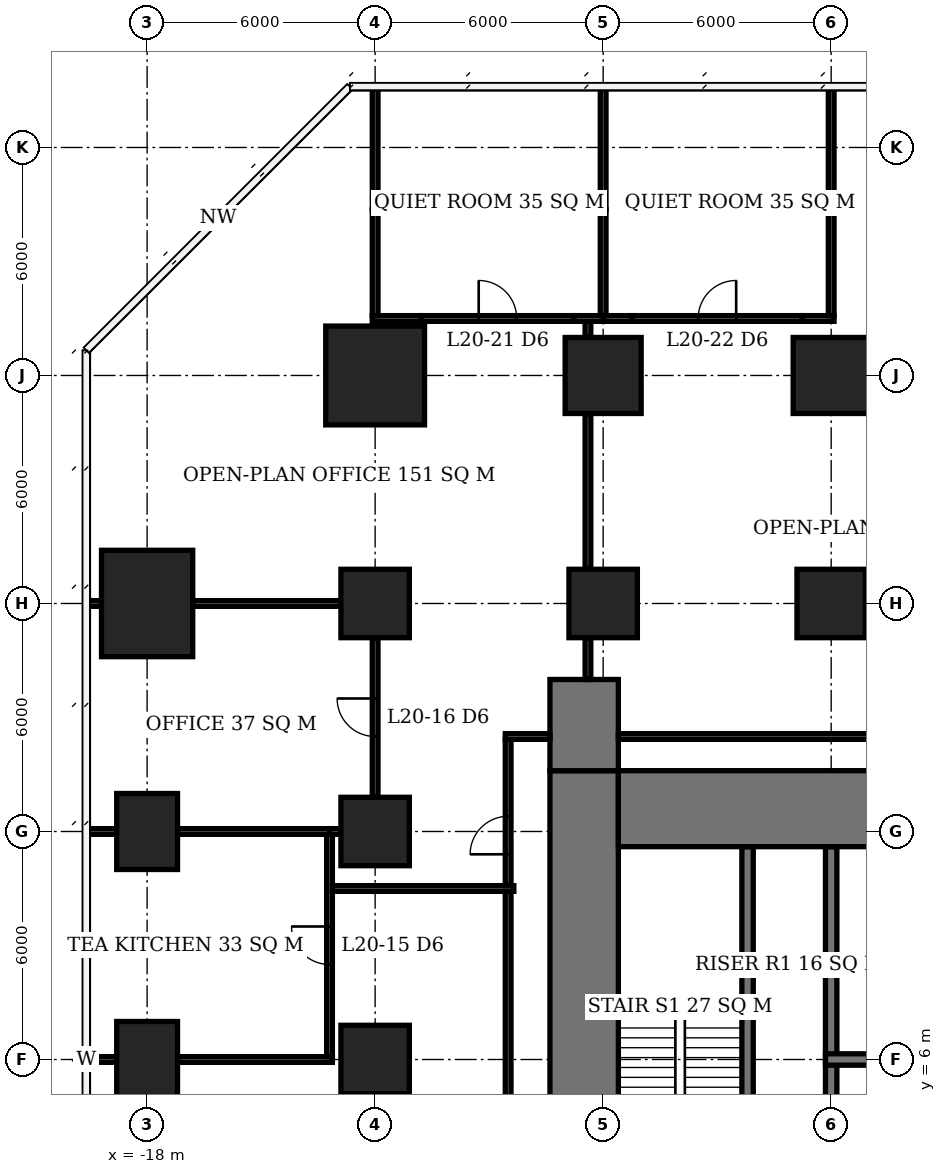
"""IFC4 building model, lengths in metres.
Left out: names, types, materials, properties, quantities, classifications, styles, units other than length and angle.
Written with IfcOpenShell. Run it as: python <this file> out.ifc"""

import sys

from ifc_helpers import new_model, si_unit, direction, frame, frame_2d, origin, origin_2d, place, context, subcontext, project, spatial, rectangle, extrude, element, fill, save


model = new_model("IFC4")
c1 = context("Model", 3, precision=1e-05, world=origin(), true_north=direction((0.0, 1.0)))
c2 = subcontext(c1, "Body", "Model", "MODEL_VIEW")
j1 = project(units=[si_unit("LENGTHUNIT", "METRE"), si_unit("PLANEANGLEUNIT", "RADIAN")], contexts=[c1])
p1 = place(None, origin())
s1 = spatial("IfcSite", under=j1, at=p1, CompositionType="ELEMENT")
p2 = place(p1, origin())
s2 = spatial("IfcBuilding", under=s1, at=p2, CompositionType="ELEMENT")
p3 = place(p2, frame((0.0, 0.0, 84.5)))
s3 = spatial("IfcBuildingStorey", under=s2, at=p3, CompositionType="ELEMENT", Elevation=84.5)
for number, where, z_axis, x_axis in (
    (1, (-18.0, 6.0, 0.0), (0.0, 0.0, 1.0), (0.0, 1.0, 0.0)),
    (2, (-18.0, 12.0, 0.0), (0.0, 0.0, 1.0), (0.0, 1.0, 0.0)),
):
    element("IfcColumn", number, at=place(p3, frame(where, z_axis=z_axis, x_axis=x_axis)), inside=s3, PredefinedType="COLUMN", context=c2, shape_type="SweptSolid", body=[
        extrude(rectangle(XDim=2.0, YDim=1.6, at=origin_2d()), origin(), (0.0, 0.0, 1.0), 3.9),
    ])
p4 = place(p3, frame((-18.0, 18.0, 0.0), z_axis=(0.0, 0.0, 1.0), x_axis=(0.0, 1.0, 0.0)))
e3 = element("IfcColumn", 3, at=p4, inside=s3, PredefinedType="COLUMN", context=c2, shape_type="SweptSolid", body=[
    extrude(rectangle(XDim=2.8, YDim=2.4, at=origin_2d()), origin(), (0.0, 0.0, 1.0), 3.9),
])
for number, where, z_axis, x_axis in (
    (4, (-12.0, 6.0, 0.0), (0.0, 0.0, 1.0), (1.0, 0.0, 0.0)),
    (5, (-12.0, 12.0, 0.0), (0.0, 0.0, 1.0), (1.0, 0.0, 0.0)),
    (6, (-12.0, 18.0, 0.0), (0.0, 0.0, 1.0), (1.0, 0.0, 0.0)),
):
    element("IfcColumn", number, at=place(p3, frame(where, z_axis=z_axis, x_axis=x_axis)), inside=s3, PredefinedType="COLUMN", context=c2, shape_type="SweptSolid", body=[
        extrude(rectangle(XDim=1.8, YDim=1.8, at=origin_2d()), origin(), (0.0, 0.0, 1.0), 3.9),
    ])
p5 = place(p3, frame((-12.0, 24.0, 0.0), z_axis=(0.0, 0.0, 1.0), x_axis=(1.0, 0.0, 0.0)))
e7 = element("IfcColumn", 7, at=p5, inside=s3, PredefinedType="COLUMN", context=c2, shape_type="SweptSolid", body=[
    extrude(rectangle(XDim=2.6, YDim=2.6, at=origin_2d()), origin(), (0.0, 0.0, 1.0), 3.9),
])
p6 = place(p3, frame((-6.0, 18.0, 0.0), z_axis=(0.0, 0.0, 1.0), x_axis=(1.0, 0.0, 0.0)))
e8 = element("IfcColumn", 8, at=p6, inside=s3, PredefinedType="COLUMN", context=c2, shape_type="SweptSolid", body=[
    extrude(rectangle(XDim=1.8, YDim=1.8, at=origin_2d()), origin(), (0.0, 0.0, 1.0), 3.9),
])
p7 = place(p3, frame((-6.0, 24.0, 0.0), z_axis=(0.0, 0.0, 1.0), x_axis=(1.0, 0.0, 0.0)))
e9 = element("IfcColumn", 9, at=p7, inside=s3, PredefinedType="COLUMN", context=c2, shape_type="SweptSolid", body=[
    extrude(rectangle(XDim=2.0, YDim=2.0, at=origin_2d()), origin(), (0.0, 0.0, 1.0), 3.9),
])
p8 = place(p3, frame((0.0, 18.0, 0.0), z_axis=(0.0, 0.0, 1.0), x_axis=(1.0, 0.0, 0.0)))
e10 = element("IfcColumn", 10, at=p8, inside=s3, PredefinedType="COLUMN", context=c2, shape_type="SweptSolid", body=[
    extrude(rectangle(XDim=1.8, YDim=1.8, at=origin_2d()), origin(), (0.0, 0.0, 1.0), 3.9),
])
p9 = place(p3, frame((0.0, 24.0, 0.0), z_axis=(0.0, 0.0, 1.0), x_axis=(1.0, 0.0, 0.0)))
e11 = element("IfcColumn", 11, at=p9, inside=s3, PredefinedType="COLUMN", context=c2, shape_type="SweptSolid", body=[
    extrude(rectangle(XDim=2.0, YDim=2.0, at=origin_2d()), origin(), (0.0, 0.0, 1.0), 3.9),
])
p10 = place(p3, frame((-5.6, 12.6, 0.0), z_axis=(0.0, 0.0, 1.0), x_axis=(1.0, 0.0, 0.0)))
e12 = element("IfcWall", 12, at=p10, inside=s3, PredefinedType="SHEAR", context=c2, shape_type="SweptSolid", body=[
    extrude(rectangle(XDim=23.2, YDim=2.0, at=frame_2d((11.6, 0.0))), origin(), (0.0, 0.0, 1.0), 3.9),
])
p11 = place(p3, frame((-6.5, -7.6, 0.0), z_axis=(0.0, 0.0, 1.0), x_axis=(0.0, 1.0, 0.0)))
e13 = element("IfcWall", 13, at=p11, inside=s3, PredefinedType="SHEAR", context=c2, shape_type="SweptSolid", body=[
    extrude(rectangle(XDim=21.2, YDim=1.8, at=frame_2d((10.6, 0.0))), origin(), (0.0, 0.0, 1.0), 3.9),
])
p12 = place(p11, frame((7.8, 0.0, 0.0)))
e14 = element("IfcOpeningElement", 14, at=p12, cuts=e13, PredefinedType="OPENING", context=c2, shape_type="SweptSolid", body=[
    extrude(rectangle(XDim=1.8, YDim=2.4, at=frame_2d((0.9, 1.2))), frame((0.0, 0.91, 0.0), z_axis=(0.0, -1.0, 0.0), x_axis=(1.0, 0.0, 0.0)), (0.0, 0.0, 1.0), 1.82),
])
p13 = place(p3, frame((-6.5, 13.6, 0.0), z_axis=(0.0, 0.0, 1.0), x_axis=(0.0, 1.0, 0.0)))
e15 = element("IfcWall", 15, at=p13, inside=s3, PredefinedType="SHEAR", context=c2, shape_type="SweptSolid", body=[
    extrude(rectangle(XDim=2.4, YDim=1.8, at=frame_2d((1.2, 0.0))), origin(), (0.0, 0.0, 1.0), 3.9),
])
p14 = place(p3, frame((-0.15, 6.0, 0.0), z_axis=(0.0, 0.0, 1.0), x_axis=(1.0, 0.0, 0.0)))
e16 = element("IfcWall", 16, at=p14, inside=s3, PredefinedType="SHEAR", context=c2, shape_type="SweptSolid", body=[
    extrude(rectangle(XDim=17.75, YDim=0.3, at=frame_2d((8.875, 0.0))), origin(), (0.0, 0.0, 1.0), 3.9),
])
p15 = place(p14, frame((13.15, 0.0, 0.0)))
e17 = element("IfcOpeningElement", 17, at=p15, cuts=e16, PredefinedType="OPENING", context=c2, shape_type="SweptSolid", body=[
    extrude(rectangle(XDim=0.9, YDim=2.1, at=frame_2d((0.45, 1.05))), frame((0.0, 0.16, 0.0), z_axis=(0.0, -1.0, 0.0), x_axis=(1.0, 0.0, 0.0)), (0.0, 0.0, 1.0), 0.32),
])
p16 = place(p14, frame((16.25, 0.0, 0.0)))
e18 = element("IfcOpeningElement", 18, at=p16, cuts=e16, PredefinedType="OPENING", context=c2, shape_type="SweptSolid", body=[
    extrude(rectangle(XDim=1.0, YDim=2.1, at=frame_2d((0.5, 1.05))), frame((0.0, 0.16, 0.0), z_axis=(0.0, -1.0, 0.0), x_axis=(1.0, 0.0, 0.0)), (0.0, 0.0, 1.0), 0.32),
])
p17 = place(p14, frame((1.1, 0.0, 0.0)))
e19 = element("IfcOpeningElement", 19, at=p17, cuts=e16, PredefinedType="OPENING", context=c2, shape_type="SweptSolid", body=[
    extrude(rectangle(XDim=1.1, YDim=2.1, at=frame_2d((0.55, 1.05))), frame((0.0, 0.16, 0.0), z_axis=(0.0, -1.0, 0.0), x_axis=(1.0, 0.0, 0.0)), (0.0, 0.0, 1.0), 0.32),
])
p18 = place(p14, frame((4.1, 0.0, 0.0)))
e20 = element("IfcOpeningElement", 20, at=p18, cuts=e16, PredefinedType="OPENING", context=c2, shape_type="SweptSolid", body=[
    extrude(rectangle(XDim=1.1, YDim=2.1, at=frame_2d((0.55, 1.05))), frame((0.0, 0.16, 0.0), z_axis=(0.0, -1.0, 0.0), x_axis=(1.0, 0.0, 0.0)), (0.0, 0.0, 1.0), 0.32),
])
p19 = place(p14, frame((7.1, 0.0, 0.0)))
e21 = element("IfcOpeningElement", 21, at=p19, cuts=e16, PredefinedType="OPENING", context=c2, shape_type="SweptSolid", body=[
    extrude(rectangle(XDim=1.1, YDim=2.1, at=frame_2d((0.55, 1.05))), frame((0.0, 0.16, 0.0), z_axis=(0.0, -1.0, 0.0), x_axis=(1.0, 0.0, 0.0)), (0.0, 0.0, 1.0), 0.32),
])
p20 = place(p14, frame((10.1, 0.0, 0.0)))
e22 = element("IfcOpeningElement", 22, at=p20, cuts=e16, PredefinedType="OPENING", context=c2, shape_type="SweptSolid", body=[
    extrude(rectangle(XDim=1.1, YDim=2.1, at=frame_2d((0.55, 1.05))), frame((0.0, 0.16, 0.0), z_axis=(0.0, -1.0, 0.0), x_axis=(1.0, 0.0, 0.0)), (0.0, 0.0, 1.0), 0.32),
])
for number, where, z_axis, x_axis in (
    (23, (0.0, 3.15, 0.0), (0.0, 0.0, 1.0), (0.0, 1.0, 0.0)),
    (24, (-2.2, 3.15, 0.0), (0.0, 0.0, 1.0), (0.0, 1.0, 0.0)),
):
    element("IfcWall", number, at=place(p3, frame(where, z_axis=z_axis, x_axis=x_axis)), inside=s3, PredefinedType="SHEAR", context=c2, shape_type="SweptSolid", body=[
        extrude(rectangle(XDim=8.45, YDim=0.3, at=frame_2d((4.225, 0.0))), origin(), (0.0, 0.0, 1.0), 3.9),
    ])
p21 = place(p3, frame((-19.55, 6.0, 0.0), z_axis=(0.0, 0.0, 1.0), x_axis=(1.0, 0.0, 0.0)))
e25 = element("IfcWall", 25, at=p21, inside=s3, PredefinedType="PARTITIONING", context=c2, shape_type="SweptSolid", body=[
    extrude(rectangle(XDim=0.75, YDim=0.15, at=frame_2d((0.375, 0.0))), origin(), (0.0, 0.0, 1.0), 2.15),
])
p22 = place(p3, frame((-17.2, 6.0, 0.0), z_axis=(0.0, 0.0, 1.0), x_axis=(1.0, 0.0, 0.0)))
e26 = element("IfcWall", 26, at=p22, inside=s3, PredefinedType="PARTITIONING", context=c2, shape_type="SweptSolid", body=[
    extrude(rectangle(XDim=4.075, YDim=0.15, at=frame_2d((2.038, 0.0))), origin(), (0.0, 0.0, 1.0), 3.65),
])
p23 = place(p3, frame((-19.6, 12.0, 0.0), z_axis=(0.0, 0.0, 1.0), x_axis=(1.0, 0.0, 0.0)))
e27 = element("IfcWall", 27, at=p23, inside=s3, PredefinedType="PARTITIONING", context=c2, shape_type="SweptSolid", body=[
    extrude(rectangle(XDim=0.8, YDim=0.15, at=frame_2d((0.4, 0.0))), origin(), (0.0, 0.0, 1.0), 2.15),
])
p24 = place(p3, frame((-17.2, 12.0, 0.0), z_axis=(0.0, 0.0, 1.0), x_axis=(1.0, 0.0, 0.0)))
e28 = element("IfcWall", 28, at=p24, inside=s3, PredefinedType="PARTITIONING", context=c2, shape_type="SweptSolid", body=[
    extrude(rectangle(XDim=4.075, YDim=0.15, at=frame_2d((2.038, 0.0))), origin(), (0.0, 0.0, 1.0), 3.65),
])
p25 = place(p3, frame((-13.2, 12.0, 0.0), z_axis=(0.0, 0.0, 1.0), x_axis=(1.0, 0.0, 0.0)))
e29 = element("IfcWall", 29, at=p25, inside=s3, PredefinedType="PARTITIONING", context=c2, shape_type="SweptSolid", body=[
    extrude(rectangle(XDim=0.3, YDim=0.15, at=frame_2d((0.15, 0.0))), origin(), (0.0, 0.0, 1.0), 3.65),
])
p26 = place(p3, frame((-19.6, 18.0, 0.0), z_axis=(0.0, 0.0, 1.0), x_axis=(1.0, 0.0, 0.0)))
e30 = element("IfcWall", 30, at=p26, inside=s3, PredefinedType="PARTITIONING", context=c2, shape_type="SweptSolid", body=[
    extrude(rectangle(XDim=0.4, YDim=0.15, at=frame_2d((0.2, 0.0))), origin(), (0.0, 0.0, 1.0), 2.15),
])
p27 = place(p3, frame((-16.8, 18.0, 0.0), z_axis=(0.0, 0.0, 1.0), x_axis=(1.0, 0.0, 0.0)))
e31 = element("IfcWall", 31, at=p27, inside=s3, PredefinedType="PARTITIONING", context=c2, shape_type="SweptSolid", body=[
    extrude(rectangle(XDim=3.9, YDim=0.15, at=frame_2d((1.95, 0.0))), origin(), (0.0, 0.0, 1.0), 3.65),
])
p28 = place(p3, frame((-12.075, 25.5, 0.0), z_axis=(0.0, 0.0, 1.0), x_axis=(1.0, 0.0, 0.0)))
e32 = element("IfcWall", 32, at=p28, inside=s3, PredefinedType="PARTITIONING", context=c2, shape_type="SweptSolid", body=[
    extrude(rectangle(XDim=1.285, YDim=0.15, at=frame_2d((0.643, 0.0))), origin(), (0.0, 0.0, 1.0), 2.15),
])
p29 = place(p3, frame((-10.79, 25.5, 0.0), z_axis=(0.0, 0.0, 1.0), x_axis=(1.0, 0.0, 0.0)))
e33 = element("IfcWall", 33, at=p29, inside=s3, PredefinedType="PARTITIONING", context=c2, shape_type="SweptSolid", body=[
    extrude(rectangle(XDim=4.03, YDim=0.15, at=frame_2d((2.015, 0.0))), origin(), (0.0, 0.0, 1.0), 3.65),
])
p30 = place(p29, frame((1.515, 0.0, 0.0)))
e34 = element("IfcOpeningElement", 34, at=p30, cuts=e33, PredefinedType="OPENING", context=c2, shape_type="SweptSolid", body=[
    extrude(rectangle(XDim=1.0, YDim=2.1, at=frame_2d((0.5, 1.05))), frame((0.0, 0.085, 0.0), z_axis=(0.0, -1.0, 0.0), x_axis=(1.0, 0.0, 0.0)), (0.0, 0.0, 1.0), 0.17),
])
p31 = place(p3, frame((-6.76, 25.5, 0.0), z_axis=(0.0, 0.0, 1.0), x_axis=(1.0, 0.0, 0.0)))
e35 = element("IfcWall", 35, at=p31, inside=s3, PredefinedType="PARTITIONING", context=c2, shape_type="SweptSolid", body=[
    extrude(rectangle(XDim=0.835, YDim=0.15, at=frame_2d((0.417, 0.0))), origin(), (0.0, 0.0, 1.0), 2.15),
])
p32 = place(p3, frame((-6.0, 25.5, 0.0), z_axis=(0.0, 0.0, 1.0), x_axis=(1.0, 0.0, 0.0)))
e36 = element("IfcWall", 36, at=p32, inside=s3, PredefinedType="PARTITIONING", context=c2, shape_type="SweptSolid", body=[
    extrude(rectangle(XDim=0.76, YDim=0.15, at=frame_2d((0.38, 0.0))), origin(), (0.0, 0.0, 1.0), 2.15),
])
p33 = place(p3, frame((-5.24, 25.5, 0.0), z_axis=(0.0, 0.0, 1.0), x_axis=(1.0, 0.0, 0.0)))
e37 = element("IfcWall", 37, at=p33, inside=s3, PredefinedType="PARTITIONING", context=c2, shape_type="SweptSolid", body=[
    extrude(rectangle(XDim=4.48, YDim=0.15, at=frame_2d((2.24, 0.0))), origin(), (0.0, 0.0, 1.0), 3.65),
])
p34 = place(p33, frame((1.74, 0.0, 0.0)))
e38 = element("IfcOpeningElement", 38, at=p34, cuts=e37, PredefinedType="OPENING", context=c2, shape_type="SweptSolid", body=[
    extrude(rectangle(XDim=1.0, YDim=2.1, at=frame_2d((0.5, 1.05))), frame((0.0, 0.085, 0.0), z_axis=(0.0, -1.0, 0.0), x_axis=(1.0, 0.0, 0.0)), (0.0, 0.0, 1.0), 0.17),
])
p35 = place(p3, frame((-0.76, 25.5, 0.0), z_axis=(0.0, 0.0, 1.0), x_axis=(1.0, 0.0, 0.0)))
e39 = element("IfcWall", 39, at=p35, inside=s3, PredefinedType="PARTITIONING", context=c2, shape_type="SweptSolid", body=[
    extrude(rectangle(XDim=0.835, YDim=0.15, at=frame_2d((0.417, 0.0))), origin(), (0.0, 0.0, 1.0), 2.15),
])
p36 = place(p3, frame((-13.2, 6.075, 0.0), z_axis=(0.0, 0.0, 1.0), x_axis=(0.0, 1.0, 0.0)))
e40 = element("IfcWall", 40, at=p36, inside=s3, PredefinedType="PARTITIONING", context=c2, shape_type="SweptSolid", body=[
    extrude(rectangle(XDim=5.85, YDim=0.15, at=frame_2d((2.925, 0.0))), origin(), (0.0, 0.0, 1.0), 3.65),
])
p37 = place(p36, frame((2.425, 0.0, 0.0)))
e41 = element("IfcOpeningElement", 41, at=p37, cuts=e40, PredefinedType="OPENING", context=c2, shape_type="SweptSolid", body=[
    extrude(rectangle(XDim=1.0, YDim=2.1, at=frame_2d((0.5, 1.05))), frame((0.0, 0.085, 0.0), z_axis=(0.0, -1.0, 0.0), x_axis=(1.0, 0.0, 0.0)), (0.0, 0.0, 1.0), 0.17),
])
p38 = place(p3, frame((-12.0, 12.9, 0.0), z_axis=(0.0, 0.0, 1.0), x_axis=(0.0, 1.0, 0.0)))
e42 = element("IfcWall", 42, at=p38, inside=s3, PredefinedType="PARTITIONING", context=c2, shape_type="SweptSolid", body=[
    extrude(rectangle(XDim=4.2, YDim=0.15, at=frame_2d((2.1, 0.0))), origin(), (0.0, 0.0, 1.0), 3.65),
])
p39 = place(p38, frame((1.6, 0.0, 0.0)))
e43 = element("IfcOpeningElement", 43, at=p39, cuts=e42, PredefinedType="OPENING", context=c2, shape_type="SweptSolid", body=[
    extrude(rectangle(XDim=1.0, YDim=2.1, at=frame_2d((0.5, 1.05))), frame((0.0, 0.085, 0.0), z_axis=(0.0, -1.0, 0.0), x_axis=(1.0, 0.0, 0.0)), (0.0, 0.0, 1.0), 0.17),
])
p40 = place(p3, frame((-12.0, 25.575, 0.0), z_axis=(0.0, 0.0, 1.0), x_axis=(0.0, 1.0, 0.0)))
e44 = element("IfcWall", 44, at=p40, inside=s3, PredefinedType="PARTITIONING", context=c2, shape_type="SweptSolid", body=[
    extrude(rectangle(XDim=2.785, YDim=0.15, at=frame_2d((1.393, 0.0))), origin(), (0.0, 0.0, 1.0), 2.15),
])
p41 = place(p3, frame((-12.0, 28.36, 0.0), z_axis=(0.0, 0.0, 1.0), x_axis=(0.0, 1.0, 0.0)))
e45 = element("IfcWall", 45, at=p41, inside=s3, PredefinedType="PARTITIONING", context=c2, shape_type="SweptSolid", body=[
    extrude(rectangle(XDim=3.24, YDim=0.15, at=frame_2d((1.62, 0.0))), origin(), (0.0, 0.0, 1.0), 3.65),
])
p42 = place(p3, frame((-6.0, 25.575, 0.0), z_axis=(0.0, 0.0, 1.0), x_axis=(0.0, 1.0, 0.0)))
e46 = element("IfcWall", 46, at=p42, inside=s3, PredefinedType="PARTITIONING", context=c2, shape_type="SweptSolid", body=[
    extrude(rectangle(XDim=2.785, YDim=0.15, at=frame_2d((1.393, 0.0))), origin(), (0.0, 0.0, 1.0), 2.15),
])
p43 = place(p3, frame((-6.0, 28.36, 0.0), z_axis=(0.0, 0.0, 1.0), x_axis=(0.0, 1.0, 0.0)))
e47 = element("IfcWall", 47, at=p43, inside=s3, PredefinedType="PARTITIONING", context=c2, shape_type="SweptSolid", body=[
    extrude(rectangle(XDim=3.24, YDim=0.15, at=frame_2d((1.62, 0.0))), origin(), (0.0, 0.0, 1.0), 3.65),
])
p44 = place(p3, frame((0.0, 25.575, 0.0), z_axis=(0.0, 0.0, 1.0), x_axis=(0.0, 1.0, 0.0)))
e48 = element("IfcWall", 48, at=p44, inside=s3, PredefinedType="PARTITIONING", context=c2, shape_type="SweptSolid", body=[
    extrude(rectangle(XDim=2.785, YDim=0.15, at=frame_2d((1.393, 0.0))), origin(), (0.0, 0.0, 1.0), 2.15),
])
p45 = place(p3, frame((0.0, 28.36, 0.0), z_axis=(0.0, 0.0, 1.0), x_axis=(0.0, 1.0, 0.0)))
e49 = element("IfcWall", 49, at=p45, inside=s3, PredefinedType="PARTITIONING", context=c2, shape_type="SweptSolid", body=[
    extrude(rectangle(XDim=3.24, YDim=0.15, at=frame_2d((1.62, 0.0))), origin(), (0.0, 0.0, 1.0), 3.65),
])
p46 = place(p3, frame((-13.125, 10.5, 0.0), z_axis=(0.0, 0.0, 1.0), x_axis=(1.0, 0.0, 0.0)))
e50 = element("IfcWall", 50, at=p46, inside=s3, PredefinedType="PARTITIONING", context=c2, shape_type="SweptSolid", body=[
    extrude(rectangle(XDim=4.775, YDim=0.15, at=frame_2d((2.387, 0.0))), origin(), (0.0, 0.0, 1.0), 3.65),
])
p47 = place(p3, frame((-8.5, -8.425, 0.0), z_axis=(0.0, 0.0, 1.0), x_axis=(0.0, 1.0, 0.0)))
e51 = element("IfcWall", 51, at=p47, inside=s3, PredefinedType="PARTITIONING", context=c2, shape_type="SweptSolid", body=[
    extrude(rectangle(XDim=18.85, YDim=0.15, at=frame_2d((9.425, 0.0))), origin(), (0.0, 0.0, 1.0), 3.65),
])
p48 = place(p47, frame((6.075, 0.0, 0.0)))
e52 = element("IfcOpeningElement", 52, at=p48, cuts=e51, PredefinedType="OPENING", context=c2, shape_type="SweptSolid", body=[
    extrude(rectangle(XDim=1.0, YDim=2.1, at=frame_2d((0.5, 1.05))), frame((0.0, 0.085, 0.0), z_axis=(0.0, -1.0, 0.0), x_axis=(1.0, 0.0, 0.0)), (0.0, 0.0, 1.0), 0.17),
])
p49 = place(p3, frame((-8.5, 10.575, 0.0), z_axis=(0.0, 0.0, 1.0), x_axis=(0.0, 1.0, 0.0)))
e53 = element("IfcWall", 53, at=p49, inside=s3, PredefinedType="PARTITIONING", context=c2, shape_type="SweptSolid", body=[
    extrude(rectangle(XDim=3.85, YDim=0.15, at=frame_2d((1.925, 0.0))), origin(), (0.0, 0.0, 1.0), 3.65),
])
p50 = place(p49, frame((0.825, 0.0, 0.0)))
e54 = element("IfcOpeningElement", 54, at=p50, cuts=e53, PredefinedType="OPENING", context=c2, shape_type="SweptSolid", body=[
    extrude(rectangle(XDim=1.0, YDim=2.1, at=frame_2d((0.5, 1.05))), frame((0.0, 0.085, 0.0), z_axis=(0.0, -1.0, 0.0), x_axis=(1.0, 0.0, 0.0)), (0.0, 0.0, 1.0), 0.17),
])
p51 = place(p3, frame((-8.575, 14.5, 0.0), z_axis=(0.0, 0.0, 1.0), x_axis=(1.0, 0.0, 0.0)))
e55 = element("IfcWall", 55, at=p51, inside=s3, PredefinedType="PARTITIONING", context=c2, shape_type="SweptSolid", body=[
    extrude(rectangle(XDim=1.175, YDim=0.15, at=frame_2d((0.587, 0.0))), origin(), (0.0, 0.0, 1.0), 3.65),
])
p52 = place(p3, frame((-6.4, 16.0, 0.0), z_axis=(0.0, 0.0, 1.0), x_axis=(0.0, 1.0, 0.0)))
e56 = element("IfcWall", 56, at=p52, inside=s3, PredefinedType="PARTITIONING", context=c2, shape_type="SweptSolid", body=[
    extrude(rectangle(XDim=1.1, YDim=0.15, at=frame_2d((0.55, 0.0))), origin(), (0.0, 0.0, 1.0), 3.65),
])
p53 = place(p3, frame((-6.4, 18.9, 0.0), z_axis=(0.0, 0.0, 1.0), x_axis=(0.0, 1.0, 0.0)))
e57 = element("IfcWall", 57, at=p53, inside=s3, PredefinedType="PARTITIONING", context=c2, shape_type="SweptSolid", body=[
    extrude(rectangle(XDim=4.1, YDim=0.15, at=frame_2d((2.05, 0.0))), origin(), (0.0, 0.0, 1.0), 3.65),
])
p54 = place(p3, frame((-6.4, 25.0, 0.0), z_axis=(0.0, 0.0, 1.0), x_axis=(0.0, 1.0, 0.0)))
e58 = element("IfcWall", 58, at=p54, inside=s3, PredefinedType="PARTITIONING", context=c2, shape_type="SweptSolid", body=[
    extrude(rectangle(XDim=0.425, YDim=0.15, at=frame_2d((0.212, 0.0))), origin(), (0.0, 0.0, 1.0), 2.15),
])
p55 = place(p3, frame((-5.6, 14.5, 0.0), z_axis=(0.0, 0.0, 1.0), x_axis=(1.0, 0.0, 0.0)))
e59 = element("IfcWall", 59, at=p55, inside=s3, PredefinedType="PARTITIONING", context=c2, shape_type="SweptSolid", body=[
    extrude(rectangle(XDim=16.025, YDim=0.15, at=frame_2d((8.013, 0.0))), origin(), (0.0, 0.0, 1.0), 3.65),
])
p56 = place(p55, frame((9.965, 0.0, 0.0)))
e60 = element("IfcOpeningElement", 60, at=p56, cuts=e59, PredefinedType="OPENING", context=c2, shape_type="SweptSolid", body=[
    extrude(rectangle(XDim=1.0, YDim=2.1, at=frame_2d((0.5, 1.05))), frame((0.0, 0.085, 0.0), z_axis=(0.0, -1.0, 0.0), x_axis=(1.0, 0.0, 0.0)), (0.0, 0.0, 1.0), 0.17),
])
p57 = place(p37, origin())
e61 = element("IfcDoor", 61, at=p57, inside=s3, OperationType="SINGLE_SWING_RIGHT", PredefinedType="DOOR", context=c2, shape_type="SweptSolid", body=[
    extrude(rectangle(XDim=1.0, YDim=2.1, at=frame_2d((0.5, 1.05))), frame((0.0, 0.025, 0.0), z_axis=(0.0, -1.0, 0.0), x_axis=(1.0, 0.0, 0.0)), (0.0, 0.0, 1.0), 0.05),
])
fill(e41, e61)
p58 = place(p39, origin())
e62 = element("IfcDoor", 62, at=p58, inside=s3, OperationType="SINGLE_SWING_RIGHT", PredefinedType="DOOR", context=c2, shape_type="SweptSolid", body=[
    extrude(rectangle(XDim=1.0, YDim=2.1, at=frame_2d((0.5, 1.05))), frame((0.0, 0.025, 0.0), z_axis=(0.0, -1.0, 0.0), x_axis=(1.0, 0.0, 0.0)), (0.0, 0.0, 1.0), 0.05),
])
fill(e43, e62)
p59 = place(p30, origin())
e63 = element("IfcDoor", 63, at=p59, inside=s3, OperationType="SINGLE_SWING_LEFT", PredefinedType="DOOR", context=c2, shape_type="SweptSolid", body=[
    extrude(rectangle(XDim=1.0, YDim=2.1, at=frame_2d((0.5, 1.05))), frame((0.0, 0.025, 0.0), z_axis=(0.0, -1.0, 0.0), x_axis=(1.0, 0.0, 0.0)), (0.0, 0.0, 1.0), 0.05),
])
fill(e34, e63)
p60 = place(p34, origin())
e64 = element("IfcDoor", 64, at=p60, inside=s3, OperationType="SINGLE_SWING_RIGHT", PredefinedType="DOOR", context=c2, shape_type="SweptSolid", body=[
    extrude(rectangle(XDim=1.0, YDim=2.1, at=frame_2d((0.5, 1.05))), frame((0.0, 0.025, 0.0), z_axis=(0.0, -1.0, 0.0), x_axis=(1.0, 0.0, 0.0)), (0.0, 0.0, 1.0), 0.05),
])
fill(e38, e64)
p61 = place(p50, origin())
e65 = element("IfcDoor", 65, at=p61, inside=s3, OperationType="SINGLE_SWING_LEFT", PredefinedType="DOOR", context=c2, shape_type="SweptSolid", body=[
    extrude(rectangle(XDim=1.0, YDim=2.1, at=frame_2d((0.5, 1.05))), frame((0.0, 0.025, 0.0), z_axis=(0.0, -1.0, 0.0), x_axis=(1.0, 0.0, 0.0)), (0.0, 0.0, 1.0), 0.05),
])
fill(e54, e65)
save(model, sys.argv[1])
